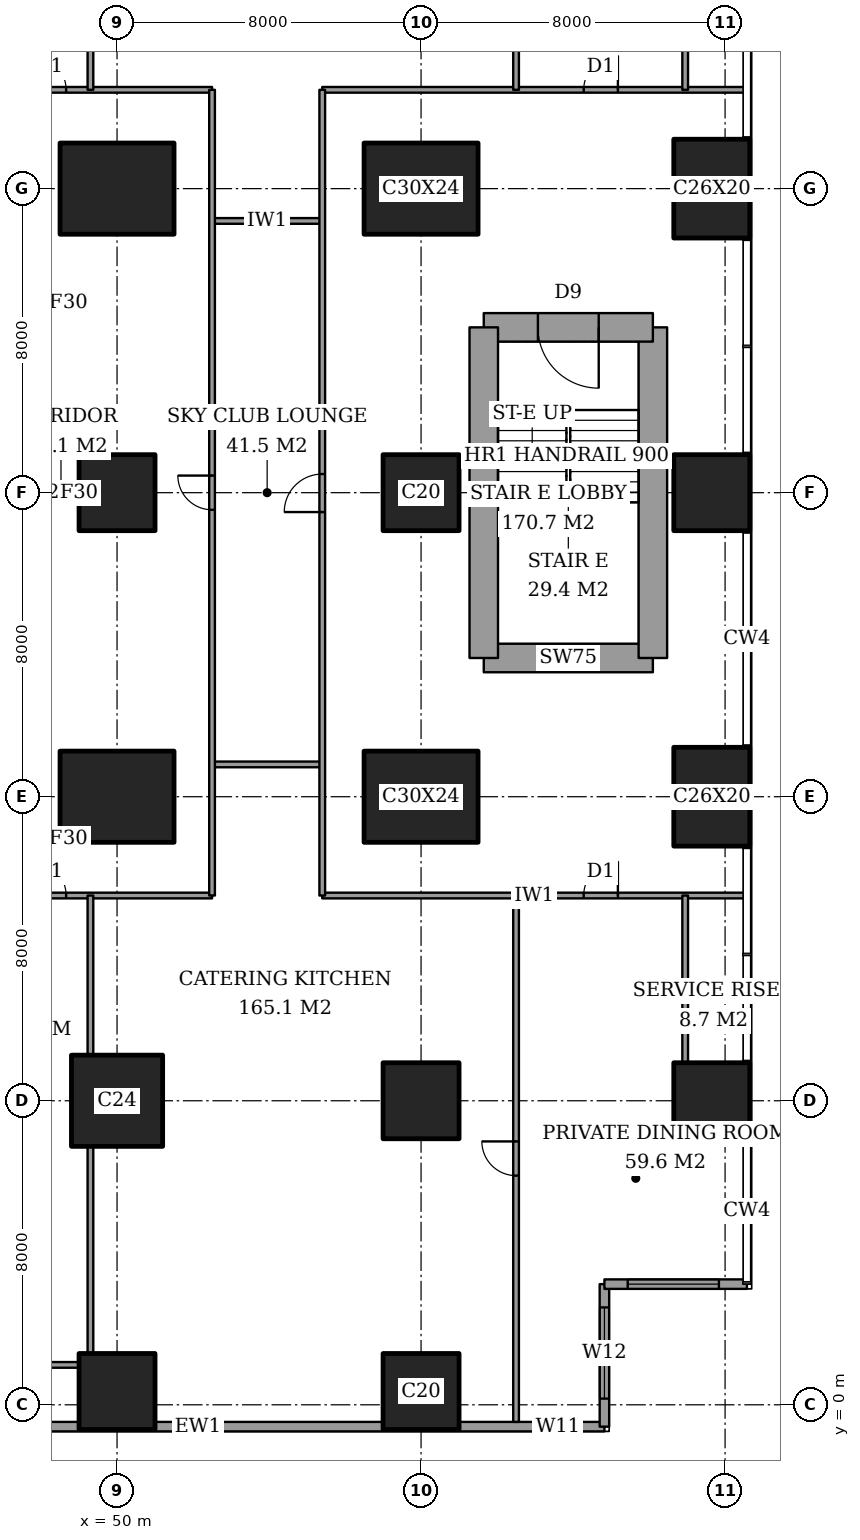
"""IFC4 building model, lengths in metres.
Left out: names, types, materials, properties, quantities, classifications, styles, units other than length and angle.
Written with IfcOpenShell. Run it as: python <this file> out.ifc"""

import sys

from ifc_helpers import new_model, si_unit, direction, frame, frame_2d, origin, origin_2d, place, context, subcontext, project, spatial, rectangle, extrude, element, fill, save


model = new_model("IFC4")
c1 = context("Model", 3, precision=1e-05, world=origin(), true_north=direction((0.0, 1.0)))
c2 = subcontext(c1, "Body", "Model", "MODEL_VIEW")
j1 = project(units=[si_unit("LENGTHUNIT", "METRE"), si_unit("PLANEANGLEUNIT", "RADIAN")], contexts=[c1])
p1 = place(None, origin())
s1 = spatial("IfcSite", under=j1, at=p1, CompositionType="ELEMENT")
p2 = place(p1, origin())
s2 = spatial("IfcBuilding", under=s1, at=p2, CompositionType="ELEMENT")
p3 = place(p2, frame((0.0, 0.0, 132.2)))
s3 = spatial("IfcBuildingStorey", under=s2, at=p3, CompositionType="ELEMENT", Elevation=132.2)
p4 = place(p3, frame((50.0, 0.35, 0.0), z_axis=(0.0, 0.0, 1.0), x_axis=(1.0, 0.0, 0.0)))
e1 = element("IfcColumn", 1, at=p4, inside=s3, PredefinedType="COLUMN", context=c2, shape_type="SweptSolid", body=[
    extrude(rectangle(XDim=2.0, YDim=2.0, at=origin_2d()), origin(), (0.0, 0.0, 1.0), 3.6),
])
p5 = place(p3, frame((50.0, 8.0, 0.0), z_axis=(0.0, 0.0, 1.0), x_axis=(1.0, 0.0, 0.0)))
e2 = element("IfcColumn", 2, at=p5, inside=s3, PredefinedType="COLUMN", context=c2, shape_type="SweptSolid", body=[
    extrude(rectangle(XDim=2.4, YDim=2.4, at=origin_2d()), origin(), (0.0, 0.0, 1.0), 3.6),
])
p6 = place(p3, frame((50.0, 16.0, 0.0), z_axis=(0.0, 0.0, 1.0), x_axis=(1.0, 0.0, 0.0)))
e3 = element("IfcColumn", 3, at=p6, inside=s3, PredefinedType="COLUMN", context=c2, shape_type="SweptSolid", body=[
    extrude(rectangle(XDim=3.0, YDim=2.4, at=origin_2d()), origin(), (0.0, 0.0, 1.0), 3.6),
])
p7 = place(p3, frame((50.0, 24.0, 0.0), z_axis=(0.0, 0.0, 1.0), x_axis=(1.0, 0.0, 0.0)))
e4 = element("IfcColumn", 4, at=p7, inside=s3, PredefinedType="COLUMN", context=c2, shape_type="SweptSolid", body=[
    extrude(rectangle(XDim=2.0, YDim=2.0, at=origin_2d()), origin(), (0.0, 0.0, 1.0), 3.6),
])
p8 = place(p3, frame((50.0, 32.0, 0.0), z_axis=(0.0, 0.0, 1.0), x_axis=(1.0, 0.0, 0.0)))
e5 = element("IfcColumn", 5, at=p8, inside=s3, PredefinedType="COLUMN", context=c2, shape_type="SweptSolid", body=[
    extrude(rectangle(XDim=3.0, YDim=2.4, at=origin_2d()), origin(), (0.0, 0.0, 1.0), 3.6),
])
for number, where, z_axis, x_axis in (
    (6, (58.0, 0.35, 0.0), (0.0, 0.0, 1.0), (1.0, 0.0, 0.0)),
    (7, (58.0, 8.0, 0.0), (0.0, 0.0, 1.0), (1.0, 0.0, 0.0)),
):
    element("IfcColumn", number, at=place(p3, frame(where, z_axis=z_axis, x_axis=x_axis)), inside=s3, PredefinedType="COLUMN", context=c2, shape_type="SweptSolid", body=[
        extrude(rectangle(XDim=2.0, YDim=2.0, at=origin_2d()), origin(), (0.0, 0.0, 1.0), 3.6),
    ])
p9 = place(p3, frame((58.0, 16.0, 0.0), z_axis=(0.0, 0.0, 1.0), x_axis=(1.0, 0.0, 0.0)))
e8 = element("IfcColumn", 8, at=p9, inside=s3, PredefinedType="COLUMN", context=c2, shape_type="SweptSolid", body=[
    extrude(rectangle(XDim=3.0, YDim=2.4, at=origin_2d()), origin(), (0.0, 0.0, 1.0), 3.6),
])
p10 = place(p3, frame((58.0, 24.0, 0.0), z_axis=(0.0, 0.0, 1.0), x_axis=(1.0, 0.0, 0.0)))
e9 = element("IfcColumn", 9, at=p10, inside=s3, PredefinedType="COLUMN", context=c2, shape_type="SweptSolid", body=[
    extrude(rectangle(XDim=2.0, YDim=2.0, at=origin_2d()), origin(), (0.0, 0.0, 1.0), 3.6),
])
p11 = place(p3, frame((58.0, 32.0, 0.0), z_axis=(0.0, 0.0, 1.0), x_axis=(1.0, 0.0, 0.0)))
e10 = element("IfcColumn", 10, at=p11, inside=s3, PredefinedType="COLUMN", context=c2, shape_type="SweptSolid", body=[
    extrude(rectangle(XDim=3.0, YDim=2.4, at=origin_2d()), origin(), (0.0, 0.0, 1.0), 3.6),
])
p12 = place(p3, frame((65.65, 8.0, 0.0), z_axis=(0.0, 0.0, 1.0), x_axis=(1.0, 0.0, 0.0)))
e11 = element("IfcColumn", 11, at=p12, inside=s3, PredefinedType="COLUMN", context=c2, shape_type="SweptSolid", body=[
    extrude(rectangle(XDim=2.0, YDim=2.0, at=origin_2d()), origin(), (0.0, 0.0, 1.0), 3.6),
])
p13 = place(p3, frame((65.65, 16.0, 0.0), z_axis=(0.0, 0.0, 1.0), x_axis=(0.0, 1.0, 0.0)))
e12 = element("IfcColumn", 12, at=p13, inside=s3, PredefinedType="COLUMN", context=c2, shape_type="SweptSolid", body=[
    extrude(rectangle(XDim=2.6, YDim=2.0, at=origin_2d()), origin(), (0.0, 0.0, 1.0), 3.6),
])
p14 = place(p3, frame((65.65, 24.0, 0.0), z_axis=(0.0, 0.0, 1.0), x_axis=(1.0, 0.0, 0.0)))
e13 = element("IfcColumn", 13, at=p14, inside=s3, PredefinedType="COLUMN", context=c2, shape_type="SweptSolid", body=[
    extrude(rectangle(XDim=2.0, YDim=2.0, at=origin_2d()), origin(), (0.0, 0.0, 1.0), 3.6),
])
p15 = place(p3, frame((65.65, 32.0, 0.0), z_axis=(0.0, 0.0, 1.0), x_axis=(0.0, 1.0, 0.0)))
e14 = element("IfcColumn", 14, at=p15, inside=s3, PredefinedType="COLUMN", context=c2, shape_type="SweptSolid", body=[
    extrude(rectangle(XDim=2.6, YDim=2.0, at=origin_2d()), origin(), (0.0, 0.0, 1.0), 3.6),
])
p16 = place(p3, frame((59.65, 19.65, 0.0), z_axis=(0.0, 0.0, 1.0), x_axis=(1.0, 0.0, 0.0)))
e15 = element("IfcWall", 15, at=p16, inside=s3, PredefinedType="SHEAR", context=c2, shape_type="SweptSolid", body=[
    extrude(rectangle(XDim=4.45, YDim=0.75, at=frame_2d((2.225, 0.0))), origin(), (0.0, 0.0, 1.0), 3.6),
])
p17 = place(p3, frame((64.1, 19.65, 0.0), z_axis=(0.0, 0.0, 1.0), x_axis=(0.0, 1.0, 0.0)))
e16 = element("IfcWall", 16, at=p17, inside=s3, PredefinedType="SHEAR", context=c2, shape_type="SweptSolid", body=[
    extrude(rectangle(XDim=8.7, YDim=0.75, at=frame_2d((4.35, 0.0))), origin(), (0.0, 0.0, 1.0), 3.6),
])
p18 = place(p3, frame((64.1, 28.35, 0.0), z_axis=(0.0, 0.0, 1.0), x_axis=(-1.0, 0.0, 0.0)))
e17 = element("IfcWall", 17, at=p18, inside=s3, PredefinedType="SHEAR", context=c2, shape_type="SweptSolid", body=[
    extrude(rectangle(XDim=4.45, YDim=0.75, at=frame_2d((2.225, 0.0))), origin(), (0.0, 0.0, 1.0), 3.6),
])
p19 = place(p18, frame((1.425, 0.0, 0.0)))
e18 = element("IfcOpeningElement", 18, at=p19, cuts=e17, PredefinedType="OPENING", context=c2, shape_type="SweptSolid", body=[
    extrude(rectangle(XDim=1.6, YDim=2.1, at=frame_2d((0.8, 1.05))), frame((0.0, 0.385, 0.0), z_axis=(0.0, -1.0, 0.0), x_axis=(1.0, 0.0, 0.0)), (0.0, 0.0, 1.0), 0.77),
])
p20 = place(p3, frame((59.65, 28.35, 0.0), z_axis=(0.0, 0.0, 1.0), x_axis=(0.0, -1.0, 0.0)))
e19 = element("IfcWall", 19, at=p20, inside=s3, PredefinedType="SHEAR", context=c2, shape_type="SweptSolid", body=[
    extrude(rectangle(XDim=8.7, YDim=0.75, at=frame_2d((4.35, 0.0))), origin(), (0.0, 0.0, 1.0), 3.6),
])
p21 = place(p3, frame((41.425, -0.575, 0.0), z_axis=(0.0, 0.0, 1.0), x_axis=(1.0, 0.0, 0.0)))
e20 = element("IfcWall", 20, at=p21, inside=s3, PredefinedType="SOLIDWALL", context=c2, shape_type="SweptSolid", body=[
    extrude(rectangle(XDim=21.4, YDim=0.25, at=frame_2d((10.7, 0.0))), origin(), (0.0, 0.0, 1.0), 3.6),
])
p22 = place(p21, frame((19.575, 0.0, 0.4)))
e21 = element("IfcOpeningElement", 21, at=p22, cuts=e20, PredefinedType="OPENING", context=c2, shape_type="SweptSolid", body=[
    extrude(rectangle(XDim=1.2, YDim=2.2, at=frame_2d((0.6, 1.1))), frame((0.0, 0.135, 0.0), z_axis=(0.0, -1.0, 0.0), x_axis=(1.0, 0.0, 0.0)), (0.0, 0.0, 1.0), 0.27),
])
p23 = place(p3, frame((62.825, -0.575, 0.0), z_axis=(0.0, 0.0, 1.0), x_axis=(0.0, 1.0, 0.0)))
e22 = element("IfcWall", 22, at=p23, inside=s3, PredefinedType="SOLIDWALL", context=c2, shape_type="SweptSolid", body=[
    extrude(rectangle(XDim=3.75, YDim=0.25, at=frame_2d((1.875, 0.0))), origin(), (0.0, 0.0, 1.0), 3.6),
])
p24 = place(p23, frame((0.738, 0.0, 0.4)))
e23 = element("IfcOpeningElement", 23, at=p24, cuts=e22, PredefinedType="OPENING", context=c2, shape_type="SweptSolid", body=[
    extrude(rectangle(XDim=2.4, YDim=2.2, at=frame_2d((1.2, 1.1))), frame((0.0, 0.135, 0.0), z_axis=(0.0, -1.0, 0.0), x_axis=(1.0, 0.0, 0.0)), (0.0, 0.0, 1.0), 0.27),
])
p25 = place(p3, frame((62.825, 3.175, 0.0), z_axis=(0.0, 0.0, 1.0), x_axis=(1.0, 0.0, 0.0)))
e24 = element("IfcWall", 24, at=p25, inside=s3, PredefinedType="SOLIDWALL", context=c2, shape_type="SweptSolid", body=[
    extrude(rectangle(XDim=3.75, YDim=0.25, at=frame_2d((1.875, 0.0))), origin(), (0.0, 0.0, 1.0), 3.6),
])
p26 = place(p25, frame((0.613, 0.0, 0.4)))
e25 = element("IfcOpeningElement", 25, at=p26, cuts=e24, PredefinedType="OPENING", context=c2, shape_type="SweptSolid", body=[
    extrude(rectangle(XDim=2.4, YDim=2.2, at=frame_2d((1.2, 1.1))), frame((0.0, 0.135, 0.0), z_axis=(0.0, -1.0, 0.0), x_axis=(1.0, 0.0, 0.0)), (0.0, 0.0, 1.0), 0.27),
])
p27 = place(p3, frame((43.35, 1.05, 0.0), z_axis=(0.0, 0.0, 1.0), x_axis=(1.0, 0.0, 0.0)))
e26 = element("IfcWall", 26, at=p27, inside=s3, PredefinedType="PARTITIONING", context=c2, shape_type="SweptSolid", body=[
    extrude(rectangle(XDim=5.65, YDim=0.15, at=frame_2d((2.825, 0.0))), origin(), (0.0, 0.0, 1.0), 3.35),
])
p28 = place(p3, frame((47.1, 13.4, 0.0), z_axis=(0.0, 0.0, 1.0), x_axis=(1.0, 0.0, 0.0)))
e27 = element("IfcWall", 27, at=p28, inside=s3, PredefinedType="PARTITIONING", context=c2, shape_type="SweptSolid", body=[
    extrude(rectangle(XDim=5.4, YDim=0.15, at=frame_2d((2.7, 0.0))), origin(), (0.0, 0.0, 1.0), 3.35),
])
p29 = place(p28, frame((0.66, 0.0, 0.0)))
e28 = element("IfcOpeningElement", 28, at=p29, cuts=e27, PredefinedType="OPENING", context=c2, shape_type="SweptSolid", body=[
    extrude(rectangle(XDim=0.9, YDim=2.1, at=frame_2d((0.45, 1.05))), frame((0.0, 0.085, 0.0), z_axis=(0.0, -1.0, 0.0), x_axis=(1.0, 0.0, 0.0)), (0.0, 0.0, 1.0), 0.17),
])
p30 = place(p3, frame((55.4, 13.4, 0.0), z_axis=(0.0, 0.0, 1.0), x_axis=(1.0, 0.0, 0.0)))
e29 = element("IfcWall", 29, at=p30, inside=s3, PredefinedType="PARTITIONING", context=c2, shape_type="SweptSolid", body=[
    extrude(rectangle(XDim=11.161, YDim=0.15, at=frame_2d((5.581, 0.0))), origin(), (0.0, 0.0, 1.0), 3.35),
])
p31 = place(p30, frame((6.88, 0.0, 0.0)))
e30 = element("IfcOpeningElement", 30, at=p31, cuts=e29, PredefinedType="OPENING", context=c2, shape_type="SweptSolid", body=[
    extrude(rectangle(XDim=0.9, YDim=2.1, at=frame_2d((0.45, 1.05))), frame((0.0, 0.085, 0.0), z_axis=(0.0, -1.0, 0.0), x_axis=(1.0, 0.0, 0.0)), (0.0, 0.0, 1.0), 0.17),
])
for number, where, z_axis, x_axis in (
    (31, (52.5, 16.85, 0.0), (0.0, 0.0, 1.0), (1.0, 0.0, 0.0)),
    (32, (52.5, 31.15, 0.0), (0.0, 0.0, 1.0), (1.0, 0.0, 0.0)),
):
    element("IfcWall", number, at=place(p3, frame(where, z_axis=z_axis, x_axis=x_axis)), inside=s3, PredefinedType="PARTITIONING", context=c2, shape_type="SweptSolid", body=[
        extrude(rectangle(XDim=2.9, YDim=0.15, at=frame_2d((1.45, 0.0))), origin(), (0.0, 0.0, 1.0), 3.35),
    ])
p32 = place(p3, frame((47.1, 34.6, 0.0), z_axis=(0.0, 0.0, 1.0), x_axis=(1.0, 0.0, 0.0)))
e33 = element("IfcWall", 33, at=p32, inside=s3, PredefinedType="PARTITIONING", context=c2, shape_type="SweptSolid", body=[
    extrude(rectangle(XDim=5.4, YDim=0.15, at=frame_2d((2.7, 0.0))), origin(), (0.0, 0.0, 1.0), 3.35),
])
p33 = place(p32, frame((0.66, 0.0, 0.0)))
e34 = element("IfcOpeningElement", 34, at=p33, cuts=e33, PredefinedType="OPENING", context=c2, shape_type="SweptSolid", body=[
    extrude(rectangle(XDim=0.9, YDim=2.1, at=frame_2d((0.45, 1.05))), frame((0.0, 0.085, 0.0), z_axis=(0.0, -1.0, 0.0), x_axis=(1.0, 0.0, 0.0)), (0.0, 0.0, 1.0), 0.17),
])
p34 = place(p3, frame((55.4, 34.6, 0.0), z_axis=(0.0, 0.0, 1.0), x_axis=(1.0, 0.0, 0.0)))
e35 = element("IfcWall", 35, at=p34, inside=s3, PredefinedType="PARTITIONING", context=c2, shape_type="SweptSolid", body=[
    extrude(rectangle(XDim=11.161, YDim=0.15, at=frame_2d((5.581, 0.0))), origin(), (0.0, 0.0, 1.0), 3.35),
])
p35 = place(p34, frame((6.88, 0.0, 0.0)))
e36 = element("IfcOpeningElement", 36, at=p35, cuts=e35, PredefinedType="OPENING", context=c2, shape_type="SweptSolid", body=[
    extrude(rectangle(XDim=0.9, YDim=2.1, at=frame_2d((0.45, 1.05))), frame((0.0, 0.085, 0.0), z_axis=(0.0, -1.0, 0.0), x_axis=(1.0, 0.0, 0.0)), (0.0, 0.0, 1.0), 0.17),
])
p36 = place(p3, frame((49.3, 1.35, 0.0), z_axis=(0.0, 0.0, 1.0), x_axis=(0.0, 1.0, 0.0)))
e37 = element("IfcWall", 37, at=p36, inside=s3, PredefinedType="PARTITIONING", context=c2, shape_type="SweptSolid", body=[
    extrude(rectangle(XDim=5.45, YDim=0.15, at=frame_2d((2.725, 0.0))), origin(), (0.0, 0.0, 1.0), 3.35),
])
for number, where, z_axis, x_axis in (
    (38, (49.3, 9.2, 0.0), (0.0, 0.0, 1.0), (0.0, 1.0, 0.0)),
    (39, (49.3, 34.6, 0.0), (0.0, 0.0, 1.0), (0.0, 1.0, 0.0)),
):
    element("IfcWall", number, at=place(p3, frame(where, z_axis=z_axis, x_axis=x_axis)), inside=s3, PredefinedType="PARTITIONING", context=c2, shape_type="SweptSolid", body=[
        extrude(rectangle(XDim=4.2, YDim=0.15, at=frame_2d((2.1, 0.0))), origin(), (0.0, 0.0, 1.0), 3.35),
    ])
p37 = place(p3, frame((52.5, 13.4, 0.0), z_axis=(0.0, 0.0, 1.0), x_axis=(0.0, 1.0, 0.0)))
e40 = element("IfcWall", 40, at=p37, inside=s3, PredefinedType="PARTITIONING", context=c2, shape_type="SweptSolid", body=[
    extrude(rectangle(XDim=21.2, YDim=0.15, at=frame_2d((10.6, 0.0))), origin(), (0.0, 0.0, 1.0), 3.35),
])
p38 = place(p37, frame((10.15, 0.0, 0.0)))
e41 = element("IfcOpeningElement", 41, at=p38, cuts=e40, PredefinedType="OPENING", context=c2, shape_type="SweptSolid", body=[
    extrude(rectangle(XDim=0.9, YDim=2.1, at=frame_2d((0.45, 1.05))), frame((0.0, 0.085, 0.0), z_axis=(0.0, -1.0, 0.0), x_axis=(1.0, 0.0, 0.0)), (0.0, 0.0, 1.0), 0.17),
])
p39 = place(p3, frame((55.4, 13.4, 0.0), z_axis=(0.0, 0.0, 1.0), x_axis=(0.0, 1.0, 0.0)))
e42 = element("IfcWall", 42, at=p39, inside=s3, PredefinedType="PARTITIONING", context=c2, shape_type="SweptSolid", body=[
    extrude(rectangle(XDim=21.2, YDim=0.15, at=frame_2d((10.6, 0.0))), origin(), (0.0, 0.0, 1.0), 3.35),
])
p40 = place(p39, frame((10.09, 0.0, 0.0)))
e43 = element("IfcOpeningElement", 43, at=p40, cuts=e42, PredefinedType="OPENING", context=c2, shape_type="SweptSolid", body=[
    extrude(rectangle(XDim=1.0, YDim=2.1, at=frame_2d((0.5, 1.05))), frame((0.0, 0.085, 0.0), z_axis=(0.0, -1.0, 0.0), x_axis=(1.0, 0.0, 0.0)), (0.0, 0.0, 1.0), 0.17),
])
p41 = place(p3, frame((60.5, -0.45, 0.0), z_axis=(0.0, 0.0, 1.0), x_axis=(0.0, 1.0, 0.0)))
e44 = element("IfcWall", 44, at=p41, inside=s3, PredefinedType="PARTITIONING", context=c2, shape_type="SweptSolid", body=[
    extrude(rectangle(XDim=13.85, YDim=0.15, at=frame_2d((6.925, 0.0))), origin(), (0.0, 0.0, 1.0), 3.35),
])
p42 = place(p41, frame((6.48, 0.0, 0.0)))
e45 = element("IfcOpeningElement", 45, at=p42, cuts=e44, PredefinedType="OPENING", context=c2, shape_type="SweptSolid", body=[
    extrude(rectangle(XDim=0.9, YDim=2.1, at=frame_2d((0.45, 1.05))), frame((0.0, 0.085, 0.0), z_axis=(0.0, -1.0, 0.0), x_axis=(1.0, 0.0, 0.0)), (0.0, 0.0, 1.0), 0.17),
])
p43 = place(p3, frame((60.5, 34.6, 0.0), z_axis=(0.0, 0.0, 1.0), x_axis=(0.0, 1.0, 0.0)))
e46 = element("IfcWall", 46, at=p43, inside=s3, PredefinedType="PARTITIONING", context=c2, shape_type="SweptSolid", body=[
    extrude(rectangle(XDim=13.85, YDim=0.15, at=frame_2d((6.925, 0.0))), origin(), (0.0, 0.0, 1.0), 3.35),
])
p44 = place(p43, frame((6.48, 0.0, 0.0)))
e47 = element("IfcOpeningElement", 47, at=p44, cuts=e46, PredefinedType="OPENING", context=c2, shape_type="SweptSolid", body=[
    extrude(rectangle(XDim=0.9, YDim=2.1, at=frame_2d((0.45, 1.05))), frame((0.0, 0.085, 0.0), z_axis=(0.0, -1.0, 0.0), x_axis=(1.0, 0.0, 0.0)), (0.0, 0.0, 1.0), 0.17),
])
for number, where, z_axis, x_axis in (
    (48, (64.95, 9.0, 0.0), (0.0, 0.0, 1.0), (0.0, 1.0, 0.0)),
    (49, (64.95, 34.6, 0.0), (0.0, 0.0, 1.0), (0.0, 1.0, 0.0)),
):
    element("IfcWall", number, at=place(p3, frame(where, z_axis=z_axis, x_axis=x_axis)), inside=s3, PredefinedType="PARTITIONING", context=c2, shape_type="SweptSolid", body=[
        extrude(rectangle(XDim=4.4, YDim=0.15, at=frame_2d((2.2, 0.0))), origin(), (0.0, 0.0, 1.0), 3.35),
    ])
p45 = place(p22, origin())
e50 = element("IfcWindow", 50, at=p45, inside=s3, PartitioningType="SINGLE_PANEL", PredefinedType="WINDOW", context=c2, shape_type="SweptSolid", body=[
    extrude(rectangle(XDim=1.2, YDim=2.2, at=frame_2d((0.6, 1.1))), frame((0.0, 0.03, 0.0), z_axis=(0.0, -1.0, 0.0), x_axis=(1.0, 0.0, 0.0)), (0.0, 0.0, 1.0), 0.06),
])
fill(e21, e50)
p46 = place(p24, origin())
e51 = element("IfcWindow", 51, at=p46, inside=s3, PartitioningType="SINGLE_PANEL", PredefinedType="WINDOW", context=c2, shape_type="SweptSolid", body=[
    extrude(rectangle(XDim=2.4, YDim=2.2, at=frame_2d((1.2, 1.1))), frame((0.0, 0.03, 0.0), z_axis=(0.0, -1.0, 0.0), x_axis=(1.0, 0.0, 0.0)), (0.0, 0.0, 1.0), 0.06),
])
fill(e23, e51)
p47 = place(p26, origin())
e52 = element("IfcWindow", 52, at=p47, inside=s3, PartitioningType="SINGLE_PANEL", PredefinedType="WINDOW", context=c2, shape_type="SweptSolid", body=[
    extrude(rectangle(XDim=2.4, YDim=2.2, at=frame_2d((1.2, 1.1))), frame((0.0, 0.03, 0.0), z_axis=(0.0, -1.0, 0.0), x_axis=(1.0, 0.0, 0.0)), (0.0, 0.0, 1.0), 0.06),
])
fill(e25, e52)
p48 = place(p40, origin())
e53 = element("IfcDoor", 53, at=p48, inside=s3, OperationType="SINGLE_SWING_RIGHT", PredefinedType="DOOR", context=c2, shape_type="SweptSolid", body=[
    extrude(rectangle(XDim=1.0, YDim=2.1, at=frame_2d((0.5, 1.05))), frame((0.0, 0.025, 0.0), z_axis=(0.0, -1.0, 0.0), x_axis=(1.0, 0.0, 0.0)), (0.0, 0.0, 1.0), 0.05),
])
fill(e43, e53)
p49 = place(p38, origin())
e54 = element("IfcDoor", 54, at=p49, inside=s3, OperationType="SINGLE_SWING_LEFT", PredefinedType="DOOR", context=c2, shape_type="SweptSolid", body=[
    extrude(rectangle(XDim=0.9, YDim=2.1, at=frame_2d((0.45, 1.05))), frame((0.0, 0.025, 0.0), z_axis=(0.0, -1.0, 0.0), x_axis=(1.0, 0.0, 0.0)), (0.0, 0.0, 1.0), 0.05),
])
fill(e41, e54)
p50 = place(p31, origin())
e55 = element("IfcDoor", 55, at=p50, inside=s3, OperationType="SINGLE_SWING_LEFT", PredefinedType="DOOR", context=c2, shape_type="SweptSolid", body=[
    extrude(rectangle(XDim=0.9, YDim=2.1, at=frame_2d((0.45, 1.05))), frame((0.0, 0.025, 0.0), z_axis=(0.0, -1.0, 0.0), x_axis=(1.0, 0.0, 0.0)), (0.0, 0.0, 1.0), 0.05),
])
fill(e30, e55)
p51 = place(p42, origin())
e56 = element("IfcDoor", 56, at=p51, inside=s3, OperationType="SINGLE_SWING_LEFT", PredefinedType="DOOR", context=c2, shape_type="SweptSolid", body=[
    extrude(rectangle(XDim=0.9, YDim=2.1, at=frame_2d((0.45, 1.05))), frame((0.0, 0.025, 0.0), z_axis=(0.0, -1.0, 0.0), x_axis=(1.0, 0.0, 0.0)), (0.0, 0.0, 1.0), 0.05),
])
fill(e45, e56)
p52 = place(p29, origin())
e57 = element("IfcDoor", 57, at=p52, inside=s3, OperationType="SINGLE_SWING_RIGHT", PredefinedType="DOOR", context=c2, shape_type="SweptSolid", body=[
    extrude(rectangle(XDim=0.9, YDim=2.1, at=frame_2d((0.45, 1.05))), frame((0.0, 0.025, 0.0), z_axis=(0.0, -1.0, 0.0), x_axis=(1.0, 0.0, 0.0)), (0.0, 0.0, 1.0), 0.05),
])
fill(e28, e57)
p53 = place(p35, origin())
e58 = element("IfcDoor", 58, at=p53, inside=s3, OperationType="SINGLE_SWING_LEFT", PredefinedType="DOOR", context=c2, shape_type="SweptSolid", body=[
    extrude(rectangle(XDim=0.9, YDim=2.1, at=frame_2d((0.45, 1.05))), frame((0.0, 0.025, 0.0), z_axis=(0.0, -1.0, 0.0), x_axis=(1.0, 0.0, 0.0)), (0.0, 0.0, 1.0), 0.05),
])
fill(e36, e58)
p54 = place(p33, origin())
e59 = element("IfcDoor", 59, at=p54, inside=s3, OperationType="SINGLE_SWING_RIGHT", PredefinedType="DOOR", context=c2, shape_type="SweptSolid", body=[
    extrude(rectangle(XDim=0.9, YDim=2.1, at=frame_2d((0.45, 1.05))), frame((0.0, 0.025, 0.0), z_axis=(0.0, -1.0, 0.0), x_axis=(1.0, 0.0, 0.0)), (0.0, 0.0, 1.0), 0.05),
])
fill(e34, e59)
p55 = place(p19, origin())
e60 = element("IfcDoor", 60, at=p55, inside=s3, OperationType="DOUBLE_DOOR_SINGLE_SWING", PredefinedType="DOOR", context=c2, shape_type="SweptSolid", body=[
    extrude(rectangle(XDim=1.6, YDim=2.1, at=frame_2d((0.8, 1.05))), frame((0.0, 0.025, 0.0), z_axis=(0.0, -1.0, 0.0), x_axis=(1.0, 0.0, 0.0)), (0.0, 0.0, 1.0), 0.05),
])
fill(e18, e60)
save(model, sys.argv[1])
